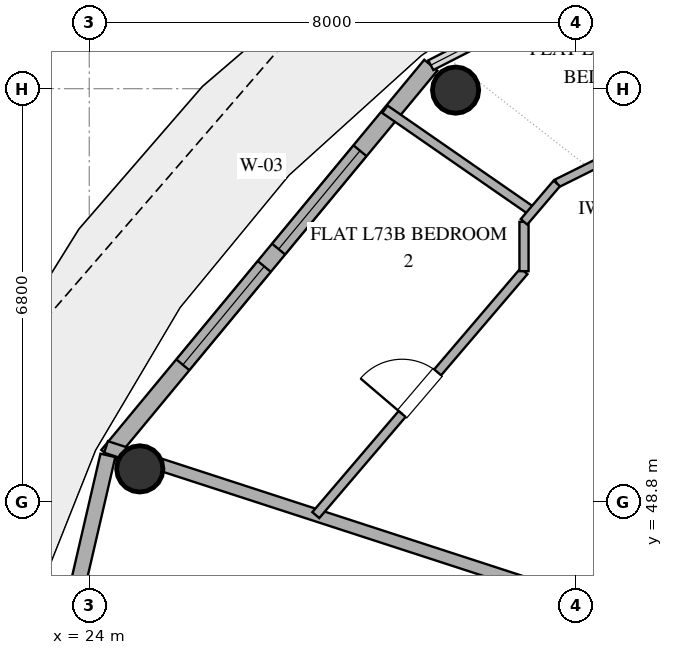
"""IFC4 building model, lengths in metres.
Left out: names, types, materials, properties, quantities, classifications, styles, units other than length and angle.
Written with IfcOpenShell. Run it as: python <this file> out.ifc"""

import sys

from ifc_helpers import new_model, si_unit, direction, frame, frame_2d, origin, origin_2d, place, context, subcontext, project, spatial, rectangle, hollow_circle, extrude, element, fill, save


model = new_model("IFC4")
c1 = context("Model", 3, precision=1e-05, world=origin(), true_north=direction((0.0, 1.0)))
c2 = subcontext(c1, "Body", "Model", "MODEL_VIEW")
j1 = project(units=[si_unit("LENGTHUNIT", "METRE"), si_unit("PLANEANGLEUNIT", "RADIAN")], contexts=[c1])
p1 = place(None, origin())
s1 = spatial("IfcSite", under=j1, at=p1, CompositionType="ELEMENT")
p2 = place(p1, origin())
s2 = spatial("IfcBuilding", under=s1, at=p2, CompositionType="ELEMENT")
p3 = place(p2, frame((0.0, 0.0, 283.8)))
s3 = spatial("IfcBuildingStorey", under=s2, at=p3, CompositionType="ELEMENT", Elevation=283.8)
for number, where, z_axis, x_axis in (
    (1, (30.025, 55.576, 0.0), (0.0, 0.0, 1.0), (1.0, 0.0, 0.0)),
    (2, (24.831, 49.347, 0.0), (0.0, 0.0, 1.0), (1.0, 0.0, 0.0)),
):
    element("IfcColumn", number, at=place(p3, frame(where, z_axis=z_axis, x_axis=x_axis)), inside=s3, PredefinedType="COLUMN", context=c2, shape_type="SweptSolid", body=[
        extrude(hollow_circle(Radius=0.381, WallThickness=0.025, at=origin_2d()), origin(), (0.0, 0.0, 1.0), 3.37),
    ])
p4 = place(p3, frame((29.617, 55.987, 0.0), z_axis=(0.0, 0.0, 1.0), x_axis=(-0.63761509934, -0.770355103243, 0.0)))
e3 = element("IfcWall", 3, at=p4, inside=s3, PredefinedType="SOLIDWALL", context=c2, shape_type="SweptSolid", body=[
    extrude(rectangle(XDim=8.33, YDim=0.28, at=frame_2d((4.165, 0.0))), origin(), (0.0, 0.0, 1.0), 3.37),
])
p5 = place(p4, frame((1.826, 0.0, 0.85)))
e4 = element("IfcOpeningElement", 4, at=p5, cuts=e3, PredefinedType="OPENING", context=c2, shape_type="SweptSolid", body=[
    extrude(rectangle(XDim=2.1, YDim=2.2, at=frame_2d((1.05, 1.1))), frame((0.0, 0.15, 0.0), z_axis=(0.0, -1.0, 0.0), x_axis=(1.0, 0.0, 0.0)), (0.0, 0.0, 1.0), 0.3),
])
p6 = place(p4, frame((4.296, 0.0, 0.85)))
e5 = element("IfcOpeningElement", 5, at=p6, cuts=e3, PredefinedType="OPENING", context=c2, shape_type="SweptSolid", body=[
    extrude(rectangle(XDim=2.1, YDim=2.2, at=frame_2d((1.05, 1.1))), frame((0.0, 0.15, 0.0), z_axis=(0.0, -1.0, 0.0), x_axis=(1.0, 0.0, 0.0)), (0.0, 0.0, 1.0), 0.3),
])
p7 = place(p3, frame((24.306, 49.57, 0.0), z_axis=(0.0, 0.0, 1.0), x_axis=(-0.225635078214, -0.974211892495, 0.0)))
e6 = element("IfcWall", 6, at=p7, inside=s3, PredefinedType="SOLIDWALL", context=c2, shape_type="SweptSolid", body=[
    extrude(rectangle(XDim=7.77, YDim=0.25, at=frame_2d((3.885, 0.0))), origin(), (0.0, 0.0, 1.0), 3.37),
])
p8 = place(p7, frame((5.03, 0.0, 1.42)))
e7 = element("IfcOpeningElement", 7, at=p8, cuts=e6, PredefinedType="OPENING", context=c2, shape_type="SweptSolid", body=[
    extrude(rectangle(XDim=1.0, YDim=1.05, at=frame_2d((0.5, 0.525))), frame((0.0, 0.135, 0.0), z_axis=(0.0, -1.0, 0.0), x_axis=(1.0, 0.0, 0.0)), (0.0, 0.0, 1.0), 0.27),
])
p9 = place(p3, frame((24.276, 49.708, 0.0), z_axis=(0.0, 0.0, 1.0), x_axis=(0.951054334328, -0.309023709699, 0.0)))
e8 = element("IfcWall", 8, at=p9, inside=s3, PredefinedType="PARTITIONING", context=c2, shape_type="SweptSolid", body=[
    extrude(rectangle(XDim=11.065, YDim=0.2, at=frame_2d((5.533, 0.0))), origin(), (0.0, 0.0, 1.0), 2.73),
])
p10 = place(p3, frame((27.726, 48.587, 0.0), z_axis=(0.0, 0.0, 1.0), x_axis=(0.649196412447, 0.760620810961, 0.0)))
e9 = element("IfcWall", 9, at=p10, inside=s3, PredefinedType="PARTITIONING", context=c2, shape_type="SweptSolid", body=[
    extrude(rectangle(XDim=5.274, YDim=0.15, at=frame_2d((2.637, 0.0))), origin(), (0.0, 0.0, 1.0), 2.73),
])
p11 = place(p10, frame((2.187, 0.0, 0.0)))
e10 = element("IfcOpeningElement", 10, at=p11, cuts=e9, PredefinedType="OPENING", context=c2, shape_type="SweptSolid", body=[
    extrude(rectangle(XDim=0.9, YDim=2.1, at=frame_2d((0.45, 1.05))), frame((0.0, 0.085, 0.0), z_axis=(0.0, -1.0, 0.0), x_axis=(1.0, 0.0, 0.0)), (0.0, 0.0, 1.0), 0.17),
])
p12 = place(p3, frame((31.293, 53.578, 0.0), z_axis=(0.0, 0.0, 1.0), x_axis=(-0.821957300328, 0.569549116792, 0.0)))
e11 = element("IfcWall", 11, at=p12, inside=s3, PredefinedType="PARTITIONING", context=c2, shape_type="SweptSolid", body=[
    extrude(rectangle(XDim=2.957, YDim=0.15, at=frame_2d((1.479, 0.0))), origin(), (0.0, 0.0, 1.0), 2.73),
])
p13 = place(p3, frame((32.711, 54.55, 0.0), z_axis=(0.0, 0.0, 1.0), x_axis=(-0.895409226325, -0.445244109912, 0.0)))
e12 = element("IfcWall", 12, at=p13, inside=s3, PredefinedType="PARTITIONING", context=c2, shape_type="SweptSolid", body=[
    extrude(rectangle(XDim=1.141, YDim=0.14, at=frame_2d((0.571, 0.0))), origin(), (0.0, 0.0, 1.0), 2.73),
])
p14 = place(p3, frame((31.15, 52.599, 0.0), z_axis=(0.0, 0.0, 1.0), x_axis=(0.0, 1.0, 0.0)))
e13 = element("IfcWall", 13, at=p14, inside=s3, PredefinedType="PARTITIONING", context=c2, shape_type="SweptSolid", body=[
    extrude(rectangle(XDim=0.812, YDim=0.15, at=frame_2d((0.406, 0.0))), origin(), (0.0, 0.0, 1.0), 2.73),
])
p15 = place(p3, frame((31.689, 54.042, 0.0), z_axis=(0.0, 0.0, 1.0), x_axis=(-0.649191857323, -0.760624698774, 0.0)))
e14 = element("IfcWall", 14, at=p15, inside=s3, PredefinedType="PARTITIONING", context=c2, shape_type="SweptSolid", body=[
    extrude(rectangle(XDim=0.83, YDim=0.14, at=frame_2d((0.415, 0.0))), origin(), (0.0, 0.0, 1.0), 2.73),
])
p16 = place(p5, origin())
e15 = element("IfcWindow", 15, at=p16, inside=s3, PartitioningType="SINGLE_PANEL", PredefinedType="WINDOW", context=c2, shape_type="SweptSolid", body=[
    extrude(rectangle(XDim=2.1, YDim=2.2, at=frame_2d((1.05, 1.1))), frame((0.0, 0.03, 0.0), z_axis=(0.0, -1.0, 0.0), x_axis=(1.0, 0.0, 0.0)), (0.0, 0.0, 1.0), 0.06),
])
fill(e4, e15)
p17 = place(p6, origin())
e16 = element("IfcWindow", 16, at=p17, inside=s3, PartitioningType="SINGLE_PANEL", PredefinedType="WINDOW", context=c2, shape_type="SweptSolid", body=[
    extrude(rectangle(XDim=2.1, YDim=2.2, at=frame_2d((1.05, 1.1))), frame((0.0, 0.03, 0.0), z_axis=(0.0, -1.0, 0.0), x_axis=(1.0, 0.0, 0.0)), (0.0, 0.0, 1.0), 0.06),
])
fill(e5, e16)
p18 = place(p11, origin())
e17 = element("IfcDoor", 17, at=p18, inside=s3, OperationType="SINGLE_SWING_LEFT", PredefinedType="DOOR", context=c2, shape_type="SweptSolid", body=[
    extrude(rectangle(XDim=0.9, YDim=2.1, at=frame_2d((0.45, 1.05))), frame((0.0, 0.025, 0.0), z_axis=(0.0, -1.0, 0.0), x_axis=(1.0, 0.0, 0.0)), (0.0, 0.0, 1.0), 0.05),
])
fill(e10, e17)
save(model, sys.argv[1])
